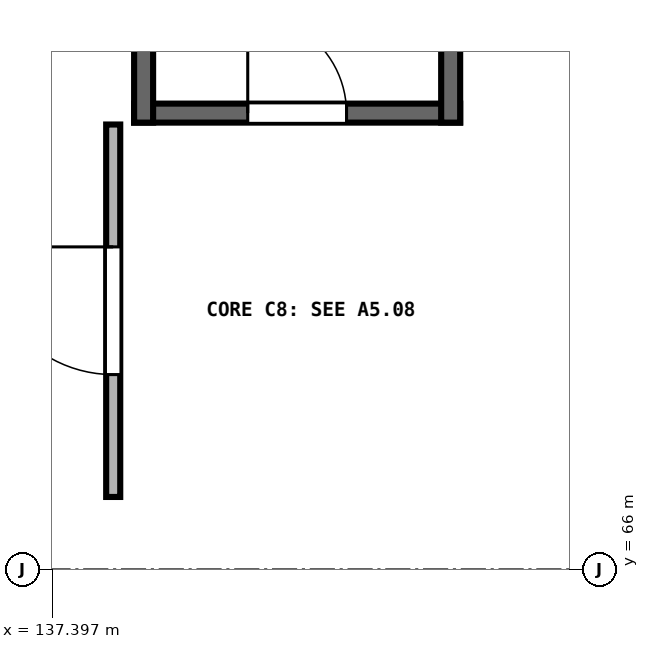
"""IFC4 building model, lengths in metres.
Left out: names, types, materials, properties, quantities, classifications, styles, units other than length and angle.
Written with IfcOpenShell. Run it as: python <this file> out.ifc"""

import sys

from ifc_helpers import new_model, si_unit, direction, frame, frame_2d, origin, place, context, subcontext, project, spatial, rectangle, extrude, element, fill, save


model = new_model("IFC4")
c1 = context("Model", 3, precision=1e-05, world=origin(), true_north=direction((0.0, 1.0)))
c2 = subcontext(c1, "Body", "Model", "MODEL_VIEW")
j1 = project(units=[si_unit("LENGTHUNIT", "METRE"), si_unit("PLANEANGLEUNIT", "RADIAN")], contexts=[c1])
p1 = place(None, origin())
s1 = spatial("IfcSite", under=j1, at=p1, CompositionType="ELEMENT")
p2 = place(p1, origin())
s2 = spatial("IfcBuilding", under=s1, at=p2, CompositionType="ELEMENT")
p3 = place(p2, origin())
s3 = spatial("IfcBuildingStorey", under=s2, at=p3, CompositionType="ELEMENT", Elevation=0.0)
p4 = place(p3, frame((138.475, 72.0, 0.0), z_axis=(0.0, 0.0, 1.0), x_axis=(1.0, 0.0, 0.0)))
e1 = element("IfcWall", 1, at=p4, inside=s3, PredefinedType="SHEAR", context=c2, shape_type="SweptSolid", body=[
    extrude(rectangle(XDim=4.29, YDim=0.25, at=frame_2d((2.145, 0.0))), origin(), (0.0, 0.0, 1.0), 5.12),
])
p5 = place(p4, frame((1.495, 0.0, 0.0)))
e2 = element("IfcOpeningElement", 2, at=p5, cuts=e1, PredefinedType="OPENING", context=c2, shape_type="SweptSolid", body=[
    extrude(rectangle(XDim=1.3, YDim=2.18, at=frame_2d((0.65, 1.09))), frame((0.0, 0.135, 0.0), z_axis=(0.0, -1.0, 0.0), x_axis=(1.0, 0.0, 0.0)), (0.0, 0.0, 1.0), 0.27),
])
for number, where, z_axis, x_axis in (
    (3, (138.6, 71.875, 0.0), (0.0, 0.0, 1.0), (0.0, 1.0, 0.0)),
    (4, (142.64, 71.875, 0.0), (0.0, 0.0, 1.0), (0.0, 1.0, 0.0)),
):
    element("IfcWall", number, at=place(p3, frame(where, z_axis=z_axis, x_axis=x_axis)), inside=s3, PredefinedType="SHEAR", context=c2, shape_type="SweptSolid", body=[
        extrude(rectangle(XDim=11.09, YDim=0.25, at=frame_2d((5.545, 0.0))), origin(), (0.0, 0.0, 1.0), 5.12),
    ])
p6 = place(p3, frame((138.2, 66.95, 0.0), z_axis=(0.0, 0.0, 1.0), x_axis=(0.0, 1.0, 0.0)))
e5 = element("IfcWall", 5, at=p6, inside=s3, PredefinedType="PARTITIONING", context=c2, shape_type="SweptSolid", body=[
    extrude(rectangle(XDim=4.9, YDim=0.185, at=frame_2d((2.45, 0.0))), origin(), (0.0, 0.0, 1.0), 5.07),
])
p7 = place(p6, frame((1.61, 0.0, 0.0)))
e6 = element("IfcOpeningElement", 6, at=p7, cuts=e5, PredefinedType="OPENING", context=c2, shape_type="SweptSolid", body=[
    extrude(rectangle(XDim=1.68, YDim=2.25, at=frame_2d((0.84, 1.125))), frame((0.0, 0.103, 0.0), z_axis=(0.0, -1.0, 0.0), x_axis=(1.0, 0.0, 0.0)), (0.0, 0.0, 1.0), 0.205),
])
p8 = place(p5, origin())
e7 = element("IfcDoor", 7, at=p8, inside=s3, OperationType="SINGLE_SWING_LEFT", PredefinedType="DOOR", context=c2, shape_type="SweptSolid", body=[
    extrude(rectangle(XDim=1.3, YDim=2.18, at=frame_2d((0.65, 1.09))), frame((0.0, 0.025, 0.0), z_axis=(0.0, -1.0, 0.0), x_axis=(1.0, 0.0, 0.0)), (0.0, 0.0, 1.0), 0.05),
])
fill(e2, e7)
p9 = place(p7, origin())
e8 = element("IfcDoor", 8, at=p9, inside=s3, OperationType="SINGLE_SWING_RIGHT", PredefinedType="DOOR", context=c2, shape_type="SweptSolid", body=[
    extrude(rectangle(XDim=1.68, YDim=2.25, at=frame_2d((0.84, 1.125))), frame((0.0, 0.025, 0.0), z_axis=(0.0, -1.0, 0.0), x_axis=(1.0, 0.0, 0.0)), (0.0, 0.0, 1.0), 0.05),
])
fill(e6, e8)
save(model, sys.argv[1])
